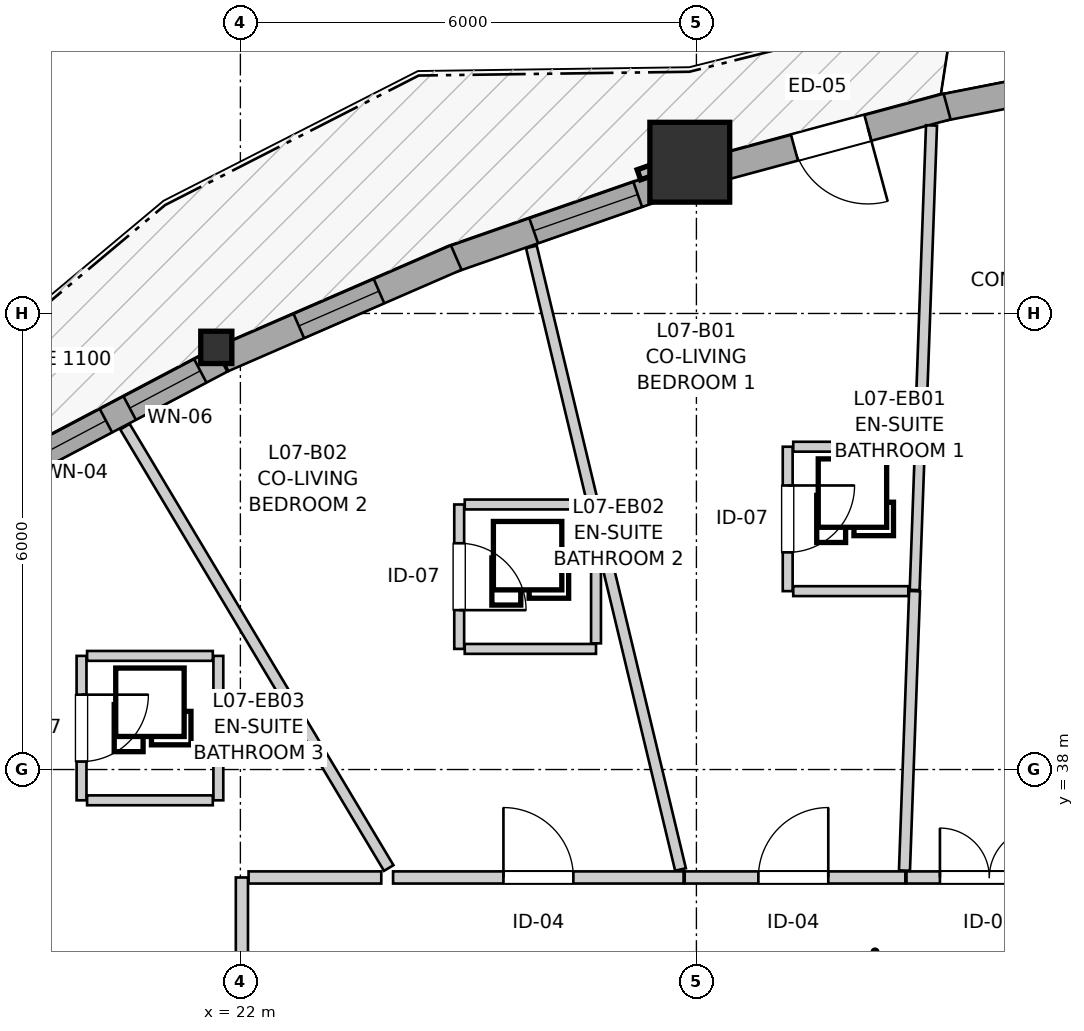
"""IFC4 building model, lengths in metres.
Left out: names, types, materials, properties, quantities, classifications, styles, units other than length and angle.
Written with IfcOpenShell. Run it as: python <this file> out.ifc"""

import sys

from ifc_helpers import new_model, si_unit, direction, frame, frame_2d, origin, origin_2d, place, context, subcontext, project, spatial, rectangle, i_section, extrude, source, transform, mapped, element, fill, save


model = new_model("IFC4")
c1 = context("Model", 3, precision=1e-05, world=origin(), true_north=direction((0.0, 1.0)))
c2 = subcontext(c1, "Body", "Model", "MODEL_VIEW")
j1 = project(units=[si_unit("LENGTHUNIT", "METRE"), si_unit("PLANEANGLEUNIT", "RADIAN")], contexts=[c1])
p1 = place(None, origin())
s1 = spatial("IfcSite", under=j1, at=p1, CompositionType="ELEMENT")
p2 = place(p1, origin())
s2 = spatial("IfcBuilding", under=s1, at=p2, CompositionType="ELEMENT")
p3 = place(p2, frame((0.0, 0.0, 27.0)))
s3 = spatial("IfcBuildingStorey", under=s2, at=p3, CompositionType="ELEMENT", Elevation=27.0)
m1 = source(origin(), c2, "Body", "SweptSolid", [
    extrude(rectangle(XDim=1.05, YDim=1.05, at=origin_2d()), origin(), (0.0, 0.0, 1.0), 2.935),
])
p4 = place(p3, frame((27.913, 45.99, 0.0), z_axis=(0.0, 0.0, 1.0), x_axis=(1.0, 0.0, 0.0)))
e1 = element("IfcColumn", 1, at=p4, inside=s3, PredefinedType="COLUMN", context=c2, shape_type="MappedRepresentation", body=[
    mapped(m1, transform((0.0, 0.0, 0.0), x_axis=(1.0, 0.0, 0.0), y_axis=(0.0, 1.0, 0.0), z_axis=(0.0, 0.0, 1.0), scale=1.0)),
])
m2 = source(origin(), c2, "Body", "SweptSolid", [
    extrude(i_section(OverallWidth=0.409, OverallDepth=0.425, WebThickness=0.03, FlangeThickness=0.048, FilletRadius=0.015, at=origin_2d()), origin(), (0.0, 0.0, 1.0), 2.935),
])
p5 = place(p3, frame((21.683, 43.554, 0.0), z_axis=(0.0, 0.0, 1.0), x_axis=(1.0, 0.0, 0.0)))
e2 = element("IfcColumn", 2, at=p5, inside=s3, PredefinedType="PILASTER", context=c2, shape_type="MappedRepresentation", body=[
    mapped(m2, transform((0.0, 0.0, 0.0), x_axis=(1.0, 0.0, 0.0), y_axis=(0.0, 1.0, 0.0), z_axis=(0.0, 0.0, 1.0), scale=1.0)),
])
p6 = place(p3, frame((34.659, 47.38, 0.0), z_axis=(0.0, 0.0, 1.0), x_axis=(-0.981222284826, -0.19288034571, 0.0)))
e3 = element("IfcWall", 3, at=p6, inside=s3, PredefinedType="SOLIDWALL", context=c2, shape_type="SweptSolid", body=[
    extrude(rectangle(XDim=3.512, YDim=0.35, at=frame_2d((1.756, 0.0))), origin(), (0.0, 0.0, 1.0), 2.415),
])
p7 = place(p6, frame((1.021, 0.0, 0.82)))
e4 = element("IfcOpeningElement", 4, at=p7, cuts=e3, PredefinedType="OPENING", context=c2, shape_type="SweptSolid", body=[
    extrude(rectangle(XDim=1.45, YDim=1.25, at=frame_2d((0.725, 0.625))), frame((0.0, 0.185, 0.0), z_axis=(0.0, -1.0, 0.0), x_axis=(1.0, 0.0, 0.0)), (0.0, 0.0, 1.0), 0.37),
])
p8 = place(p3, frame((31.298, 46.722, 0.0), z_axis=(0.0, 0.0, 1.0), x_axis=(-0.965455913242, -0.260566459057, 0.0)))
e5 = element("IfcWall", 5, at=p8, inside=s3, PredefinedType="SOLIDWALL", context=c2, shape_type="SweptSolid", body=[
    extrude(rectangle(XDim=3.159, YDim=0.35, at=frame_2d((1.58, 0.0))), origin(), (0.0, 0.0, 1.0), 2.415),
])
p9 = place(p8, frame((1.08, 0.0, 0.0)))
e6 = element("IfcOpeningElement", 6, at=p9, cuts=e5, PredefinedType="OPENING", context=c2, shape_type="SweptSolid", body=[
    extrude(rectangle(XDim=1.0, YDim=2.1, at=frame_2d((0.5, 1.05))), frame((0.0, 0.185, 0.0), z_axis=(0.0, -1.0, 0.0), x_axis=(1.0, 0.0, 0.0)), (0.0, 0.0, 1.0), 0.37),
])
p10 = place(p3, frame((27.687, 45.726, 0.0), z_axis=(0.0, 0.0, 1.0), x_axis=(-0.9441205041, -0.329600475936, 0.0)))
e7 = element("IfcWall", 7, at=p10, inside=s3, PredefinedType="SOLIDWALL", context=c2, shape_type="SweptSolid", body=[
    extrude(rectangle(XDim=3.104, YDim=0.35, at=frame_2d((1.552, 0.0))), origin(), (0.0, 0.0, 1.0), 2.415),
])
p11 = place(p10, frame((0.486, 0.0, 0.82)))
e8 = element("IfcOpeningElement", 8, at=p11, cuts=e7, PredefinedType="OPENING", context=c2, shape_type="SweptSolid", body=[
    extrude(rectangle(XDim=1.45, YDim=1.25, at=frame_2d((0.725, 0.625))), frame((0.0, 0.185, 0.0), z_axis=(0.0, -1.0, 0.0), x_axis=(1.0, 0.0, 0.0)), (0.0, 0.0, 1.0), 0.37),
])
p12 = place(p3, frame((24.84, 44.735, 0.0), z_axis=(0.0, 0.0, 1.0), x_axis=(-0.917090935142, -0.398678086532, 0.0)))
e9 = element("IfcWall", 9, at=p12, inside=s3, PredefinedType="SOLIDWALL", context=c2, shape_type="SweptSolid", body=[
    extrude(rectangle(XDim=3.346, YDim=0.35, at=frame_2d((1.673, 0.0))), origin(), (0.0, 0.0, 1.0), 2.415),
])
p13 = place(p12, frame((1.108, 0.0, 0.82)))
e10 = element("IfcOpeningElement", 10, at=p13, cuts=e9, PredefinedType="OPENING", context=c2, shape_type="SweptSolid", body=[
    extrude(rectangle(XDim=1.15, YDim=1.2, at=frame_2d((0.575, 0.6))), frame((0.0, 0.185, 0.0), z_axis=(0.0, -1.0, 0.0), x_axis=(1.0, 0.0, 0.0)), (0.0, 0.0, 1.0), 0.37),
])
p14 = place(p3, frame((21.747, 43.39, 0.0), z_axis=(0.0, 0.0, 1.0), x_axis=(-0.88437802144, -0.46677137358, 0.0)))
e11 = element("IfcWall", 11, at=p14, inside=s3, PredefinedType="SOLIDWALL", context=c2, shape_type="SweptSolid", body=[
    extrude(rectangle(XDim=3.327, YDim=0.35, at=frame_2d((1.664, 0.0))), origin(), (0.0, 0.0, 1.0), 2.415),
])
p15 = place(p14, frame((0.311, 0.0, 0.82)))
e12 = element("IfcOpeningElement", 12, at=p15, cuts=e11, PredefinedType="OPENING", context=c2, shape_type="SweptSolid", body=[
    extrude(rectangle(XDim=1.05, YDim=1.45, at=frame_2d((0.525, 0.725))), frame((0.0, 0.185, 0.0), z_axis=(0.0, -1.0, 0.0), x_axis=(1.0, 0.0, 0.0)), (0.0, 0.0, 1.0), 0.37),
])
p16 = place(p14, frame((1.714, 0.0, 0.82)))
e13 = element("IfcOpeningElement", 13, at=p16, cuts=e11, PredefinedType="OPENING", context=c2, shape_type="SweptSolid", body=[
    extrude(rectangle(XDim=1.35, YDim=1.45, at=frame_2d((0.675, 0.725))), frame((0.0, 0.185, 0.0), z_axis=(0.0, -1.0, 0.0), x_axis=(1.0, 0.0, 0.0)), (0.0, 0.0, 1.0), 0.37),
])
p17 = place(p3, frame((22.02, 32.71, 0.0), z_axis=(0.0, 0.0, 1.0), x_axis=(0.0, 1.0, 0.0)))
e14 = element("IfcWall", 14, at=p17, inside=s3, PredefinedType="PARTITIONING", context=c2, shape_type="SweptSolid", body=[
    extrude(rectangle(XDim=3.87, YDim=0.16, at=frame_2d((1.935, 0.0))), origin(), (0.0, 0.0, 1.0), 2.935),
])
p18 = place(p17, frame((1.485, 0.0, 0.0)))
e15 = element("IfcOpeningElement", 15, at=p18, cuts=e14, PredefinedType="OPENING", context=c2, shape_type="SweptSolid", body=[
    extrude(rectangle(XDim=0.92, YDim=2.1, at=frame_2d((0.46, 1.05))), frame((0.0, 0.09, 0.0), z_axis=(0.0, -1.0, 0.0), x_axis=(1.0, 0.0, 0.0)), (0.0, 0.0, 1.0), 0.18),
])
p19 = place(p3, frame((24.009, 36.58, 0.0), z_axis=(0.0, 0.0, 1.0), x_axis=(1.0, 0.0, 0.0)))
e16 = element("IfcWall", 16, at=p19, inside=s3, PredefinedType="PARTITIONING", context=c2, shape_type="SweptSolid", body=[
    extrude(rectangle(XDim=3.822, YDim=0.16, at=frame_2d((1.911, 0.0))), origin(), (0.0, 0.0, 1.0), 2.543),
])
p20 = place(p19, frame((1.452, 0.0, 0.0)))
e17 = element("IfcOpeningElement", 17, at=p20, cuts=e16, PredefinedType="OPENING", context=c2, shape_type="SweptSolid", body=[
    extrude(rectangle(XDim=0.92, YDim=2.1, at=frame_2d((0.46, 1.05))), frame((0.0, 0.09, 0.0), z_axis=(0.0, -1.0, 0.0), x_axis=(1.0, 0.0, 0.0)), (0.0, 0.0, 1.0), 0.18),
])
p21 = place(p3, frame((27.846, 36.58, 0.0), z_axis=(0.0, 0.0, 1.0), x_axis=(1.0, 0.0, 0.0)))
e18 = element("IfcWall", 18, at=p21, inside=s3, PredefinedType="PARTITIONING", context=c2, shape_type="SweptSolid", body=[
    extrude(rectangle(XDim=2.903, YDim=0.16, at=frame_2d((1.452, 0.0))), origin(), (0.0, 0.0, 1.0), 2.935),
])
p22 = place(p21, frame((0.969, 0.0, 0.0)))
e19 = element("IfcOpeningElement", 19, at=p22, cuts=e18, PredefinedType="OPENING", context=c2, shape_type="SweptSolid", body=[
    extrude(rectangle(XDim=0.92, YDim=2.1, at=frame_2d((0.46, 1.05))), frame((0.0, 0.09, 0.0), z_axis=(0.0, -1.0, 0.0), x_axis=(1.0, 0.0, 0.0)), (0.0, 0.0, 1.0), 0.18),
])
p23 = place(p3, frame((30.764, 36.58, 0.0), z_axis=(0.0, 0.0, 1.0), x_axis=(1.0, 0.0, 0.0)))
e20 = element("IfcWall", 20, at=p23, inside=s3, PredefinedType="PARTITIONING", context=c2, shape_type="SweptSolid", body=[
    extrude(rectangle(XDim=2.225, YDim=0.16, at=frame_2d((1.113, 0.0))), origin(), (0.0, 0.0, 1.0), 2.935),
])
p24 = place(p23, frame((0.44, 0.0, 0.0)))
e21 = element("IfcOpeningElement", 21, at=p24, cuts=e20, PredefinedType="OPENING", context=c2, shape_type="SweptSolid", body=[
    extrude(rectangle(XDim=1.3, YDim=2.1, at=frame_2d((0.65, 1.05))), frame((0.0, 0.09, 0.0), z_axis=(0.0, -1.0, 0.0), x_axis=(1.0, 0.0, 0.0)), (0.0, 0.0, 1.0), 0.18),
])
p25 = place(p3, frame((29.201, 42.247, 0.0), z_axis=(0.0, 0.0, 1.0), x_axis=(0.0, -1.0, 0.0)))
e22 = element("IfcWall", 22, at=p25, inside=s3, PredefinedType="PARTITIONING", context=c2, shape_type="SweptSolid", body=[
    extrude(rectangle(XDim=1.9, YDim=0.13, at=frame_2d((0.95, 0.0))), origin(), (0.0, 0.0, 1.0), 2.935),
])
p26 = place(p25, frame((0.51, 0.0, 0.0)))
e23 = element("IfcOpeningElement", 23, at=p26, cuts=e22, PredefinedType="OPENING", context=c2, shape_type="SweptSolid", body=[
    extrude(rectangle(XDim=0.88, YDim=2.05, at=frame_2d((0.44, 1.025))), frame((0.0, 0.075, 0.0), z_axis=(0.0, -1.0, 0.0), x_axis=(1.0, 0.0, 0.0)), (0.0, 0.0, 1.0), 0.15),
])
p27 = place(p3, frame((24.879, 41.487, 0.0), z_axis=(0.0, 0.0, 1.0), x_axis=(0.0, -1.0, 0.0)))
e24 = element("IfcWall", 24, at=p27, inside=s3, PredefinedType="PARTITIONING", context=c2, shape_type="SweptSolid", body=[
    extrude(rectangle(XDim=1.9, YDim=0.13, at=frame_2d((0.95, 0.0))), origin(), (0.0, 0.0, 1.0), 2.935),
])
p28 = place(p27, frame((0.51, 0.0, 0.0)))
e25 = element("IfcOpeningElement", 25, at=p28, cuts=e24, PredefinedType="OPENING", context=c2, shape_type="SweptSolid", body=[
    extrude(rectangle(XDim=0.88, YDim=2.05, at=frame_2d((0.44, 1.025))), frame((0.0, 0.075, 0.0), z_axis=(0.0, -1.0, 0.0), x_axis=(1.0, 0.0, 0.0)), (0.0, 0.0, 1.0), 0.15),
])
p29 = place(p3, frame((19.91, 39.495, 0.0), z_axis=(0.0, 0.0, 1.0), x_axis=(0.0, -1.0, 0.0)))
e26 = element("IfcWall", 26, at=p29, inside=s3, PredefinedType="PARTITIONING", context=c2, shape_type="SweptSolid", body=[
    extrude(rectangle(XDim=1.9, YDim=0.13, at=frame_2d((0.95, 0.0))), origin(), (0.0, 0.0, 1.0), 2.935),
])
p30 = place(p29, frame((0.51, 0.0, 0.0)))
e27 = element("IfcOpeningElement", 27, at=p30, cuts=e26, PredefinedType="OPENING", context=c2, shape_type="SweptSolid", body=[
    extrude(rectangle(XDim=0.88, YDim=2.05, at=frame_2d((0.44, 1.025))), frame((0.0, 0.075, 0.0), z_axis=(0.0, -1.0, 0.0), x_axis=(1.0, 0.0, 0.0)), (0.0, 0.0, 1.0), 0.15),
])
p31 = place(p3, frame((11.92, 36.618, 0.0), z_axis=(0.0, 0.0, 1.0), x_axis=(0.866473494239, -0.499223080177, 0.0)))
e28 = element("IfcWall", 28, at=p31, inside=s3, PredefinedType="PARTITIONING", context=c2, shape_type="SweptSolid", body=[
    extrude(rectangle(XDim=11.514, YDim=0.145, at=frame_2d((5.757, 0.0))), origin(), (0.0, 0.0, 1.0), 2.935),
])
p32 = place(p3, frame((14.566, 38.751, 0.0), z_axis=(0.0, 0.0, 1.0), x_axis=(0.777881688073, -0.628410756879, 0.0)))
e29 = element("IfcWall", 29, at=p32, inside=s3, PredefinedType="PARTITIONING", context=c2, shape_type="SweptSolid", body=[
    extrude(rectangle(XDim=9.413, YDim=0.145, at=frame_2d((4.707, 0.0))), origin(), (0.0, 0.0, 1.0), 2.935),
])
p33 = place(p3, frame((20.481, 42.51, 0.0), z_axis=(0.0, 0.0, 1.0), x_axis=(0.513067331262, -0.858348363773, 0.0)))
e30 = element("IfcWall", 30, at=p33, inside=s3, PredefinedType="PARTITIONING", context=c2, shape_type="SweptSolid", body=[
    extrude(rectangle(XDim=6.765, YDim=0.145, at=frame_2d((3.382, 0.0))), origin(), (0.0, 0.0, 1.0), 2.935),
])
p34 = place(p3, frame((26.664, 41.388, 0.0), z_axis=(0.0, 0.0, 1.0), x_axis=(0.233021630241, -0.972471552201, 0.0)))
e31 = element("IfcWall", 31, at=p34, inside=s3, PredefinedType="PARTITIONING", context=c2, shape_type="SweptSolid", body=[
    extrude(rectangle(XDim=4.836, YDim=0.145, at=frame_2d((2.418, 0.0))), origin(), (0.0, 0.0, 1.0), 2.935),
])
p35 = place(p3, frame((30.94, 42.247, 0.0), z_axis=(0.0, 0.0, 1.0), x_axis=(0.03624948077, 0.999342771597, 0.0)))
e32 = element("IfcWall", 32, at=p35, inside=s3, PredefinedType="PARTITIONING", context=c2, shape_type="SweptSolid", body=[
    extrude(rectangle(XDim=4.229, YDim=0.145, at=frame_2d((2.115, 0.0))), origin(), (0.0, 0.0, 1.0), 2.935),
])
p36 = place(p3, frame((30.737, 36.671, 0.0), z_axis=(0.0, 0.0, 1.0), x_axis=(0.036368539535, 0.999338445839, 0.0)))
e33 = element("IfcWall", 33, at=p36, inside=s3, PredefinedType="PARTITIONING", context=c2, shape_type="SweptSolid", body=[
    extrude(rectangle(XDim=3.679, YDim=0.145, at=frame_2d((1.839, 0.0))), origin(), (0.0, 0.0, 1.0), 2.935),
])
p37 = place(p3, frame((25.829, 44.875, 0.0), z_axis=(0.0, 0.0, 1.0), x_axis=(0.232921769711, -0.972495475154, 0.0)))
e34 = element("IfcWall", 34, at=p37, inside=s3, PredefinedType="PARTITIONING", context=c2, shape_type="SweptSolid", body=[
    extrude(rectangle(XDim=3.5, YDim=0.145, at=frame_2d((1.75, 0.0))), origin(), (0.0, 0.0, 1.0), 2.935),
])
p38 = place(p3, frame((22.108, 36.58, 0.0), z_axis=(0.0, 0.0, 1.0), x_axis=(1.0, 0.0, 0.0)))
e35 = element("IfcWall", 35, at=p38, inside=s3, PredefinedType="PARTITIONING", context=c2, shape_type="SweptSolid", body=[
    extrude(rectangle(XDim=1.746, YDim=0.16, at=frame_2d((0.873, 0.0))), origin(), (0.0, 0.0, 1.0), 2.543),
])
p39 = place(p3, frame((21.71, 37.595, 0.0), z_axis=(0.0, 0.0, 1.0), x_axis=(0.0, 1.0, 0.0)))
e36 = element("IfcWall", 36, at=p39, inside=s3, PredefinedType="PARTITIONING", context=c2, shape_type="SweptSolid", body=[
    extrude(rectangle(XDim=1.9, YDim=0.13, at=frame_2d((0.95, 0.0))), origin(), (0.0, 0.0, 1.0), 2.935),
])
p40 = place(p3, frame((30.872, 40.362, 0.0), z_axis=(0.0, 0.0, 1.0), x_axis=(0.036273279858, 0.999341908042, 0.0)))
e37 = element("IfcWall", 37, at=p40, inside=s3, PredefinedType="PARTITIONING", context=c2, shape_type="SweptSolid", body=[
    extrude(rectangle(XDim=1.871, YDim=0.13, at=frame_2d((0.936, 0.0))), origin(), (0.0, 0.0, 1.0), 2.935),
])
for number, where, z_axis, x_axis in (
    (38, (19.983, 39.495, 0.0), (0.0, 0.0, 1.0), (1.0, 0.0, 0.0)),
    (39, (19.983, 37.595, 0.0), (0.0, 0.0, 1.0), (1.0, 0.0, 0.0)),
):
    element("IfcWall", number, at=place(p3, frame(where, z_axis=z_axis, x_axis=x_axis)), inside=s3, PredefinedType="PARTITIONING", context=c2, shape_type="SweptSolid", body=[
        extrude(rectangle(XDim=1.654, YDim=0.13, at=frame_2d((0.827, 0.0))), origin(), (0.0, 0.0, 1.0), 2.935),
    ])
p41 = place(p3, frame((24.952, 39.587, 0.0), z_axis=(0.0, 0.0, 1.0), x_axis=(1.0, 0.0, 0.0)))
e40 = element("IfcWall", 40, at=p41, inside=s3, PredefinedType="PARTITIONING", context=c2, shape_type="SweptSolid", body=[
    extrude(rectangle(XDim=1.727, YDim=0.13, at=frame_2d((0.864, 0.0))), origin(), (0.0, 0.0, 1.0), 2.935),
])
p42 = place(p3, frame((24.952, 41.487, 0.0), z_axis=(0.0, 0.0, 1.0), x_axis=(1.0, 0.0, 0.0)))
e41 = element("IfcWall", 41, at=p42, inside=s3, PredefinedType="PARTITIONING", context=c2, shape_type="SweptSolid", body=[
    extrude(rectangle(XDim=1.59, YDim=0.13, at=frame_2d((0.795, 0.0))), origin(), (0.0, 0.0, 1.0), 2.503),
])
p43 = place(p3, frame((29.274, 42.247, 0.0), z_axis=(0.0, 0.0, 1.0), x_axis=(1.0, 0.0, 0.0)))
e42 = element("IfcWall", 42, at=p43, inside=s3, PredefinedType="PARTITIONING", context=c2, shape_type="SweptSolid", body=[
    extrude(rectangle(XDim=1.583, YDim=0.13, at=frame_2d((0.792, 0.0))), origin(), (0.0, 0.0, 1.0), 2.503),
])
p44 = place(p3, frame((26.679, 39.66, 0.0), z_axis=(0.0, 0.0, 1.0), x_axis=(0.0, 1.0, 0.0)))
e43 = element("IfcWall", 43, at=p44, inside=s3, PredefinedType="PARTITIONING", context=c2, shape_type="SweptSolid", body=[
    extrude(rectangle(XDim=1.38, YDim=0.13, at=frame_2d((0.69, 0.0))), origin(), (0.0, 0.0, 1.0), 2.935),
])
p45 = place(p3, frame((29.274, 40.347, 0.0), z_axis=(0.0, 0.0, 1.0), x_axis=(1.0, 0.0, 0.0)))
e44 = element("IfcWall", 44, at=p45, inside=s3, PredefinedType="PARTITIONING", context=c2, shape_type="SweptSolid", body=[
    extrude(rectangle(XDim=1.514, YDim=0.13, at=frame_2d((0.757, 0.0))), origin(), (0.0, 0.0, 1.0), 2.935),
])
m3 = source(origin(), c2, "Body", "SweptSolid", [
    extrude(rectangle(XDim=1.45, YDim=1.25, at=frame_2d((0.725, 0.625))), frame((0.0, 0.03, 0.0), z_axis=(0.0, -1.0, 0.0), x_axis=(1.0, 0.0, 0.0)), (0.0, 0.0, 1.0), 0.06),
])
p46 = place(p11, origin())
e45 = element("IfcWindow", 45, at=p46, inside=s3, PartitioningType="SINGLE_PANEL", PredefinedType="WINDOW", context=c2, shape_type="MappedRepresentation", body=[
    mapped(m3, transform((0.0, 0.0, 0.0), x_axis=(1.0, 0.0, 0.0), y_axis=(0.0, 1.0, 0.0), z_axis=(0.0, 0.0, 1.0), scale=1.0)),
])
fill(e8, e45)
m4 = source(origin(), c2, "Body", "SweptSolid", [
    extrude(rectangle(XDim=1.15, YDim=1.2, at=frame_2d((0.575, 0.6))), frame((0.0, 0.03, 0.0), z_axis=(0.0, -1.0, 0.0), x_axis=(1.0, 0.0, 0.0)), (0.0, 0.0, 1.0), 0.06),
])
p47 = place(p13, origin())
e46 = element("IfcWindow", 46, at=p47, inside=s3, PartitioningType="SINGLE_PANEL", PredefinedType="WINDOW", context=c2, shape_type="MappedRepresentation", body=[
    mapped(m4, transform((0.0, 0.0, 0.0), x_axis=(1.0, 0.0, 0.0), y_axis=(0.0, 1.0, 0.0), z_axis=(0.0, 0.0, 1.0), scale=1.0)),
])
fill(e10, e46)
m5 = source(origin(), c2, "Body", "SweptSolid", [
    extrude(rectangle(XDim=1.05, YDim=1.45, at=frame_2d((0.525, 0.725))), frame((0.0, 0.03, 0.0), z_axis=(0.0, -1.0, 0.0), x_axis=(1.0, 0.0, 0.0)), (0.0, 0.0, 1.0), 0.06),
])
p48 = place(p15, origin())
e47 = element("IfcWindow", 47, at=p48, inside=s3, PartitioningType="SINGLE_PANEL", PredefinedType="WINDOW", context=c2, shape_type="MappedRepresentation", body=[
    mapped(m5, transform((0.0, 0.0, 0.0), x_axis=(1.0, 0.0, 0.0), y_axis=(0.0, 1.0, 0.0), z_axis=(0.0, 0.0, 1.0), scale=1.0)),
])
fill(e12, e47)
m6 = source(origin(), c2, "Body", "SweptSolid", [
    extrude(rectangle(XDim=1.35, YDim=1.45, at=frame_2d((0.675, 0.725))), frame((0.0, 0.03, 0.0), z_axis=(0.0, -1.0, 0.0), x_axis=(1.0, 0.0, 0.0)), (0.0, 0.0, 1.0), 0.06),
])
p49 = place(p16, origin())
e48 = element("IfcWindow", 48, at=p49, inside=s3, PartitioningType="SINGLE_PANEL", PredefinedType="WINDOW", context=c2, shape_type="MappedRepresentation", body=[
    mapped(m6, transform((0.0, 0.0, 0.0), x_axis=(1.0, 0.0, 0.0), y_axis=(0.0, 1.0, 0.0), z_axis=(0.0, 0.0, 1.0), scale=1.0)),
])
fill(e13, e48)
m7 = source(origin(), c2, "Body", "SweptSolid", [
    extrude(rectangle(XDim=1.0, YDim=2.1, at=frame_2d((0.5, 1.05))), frame((0.0, 0.025, 0.0), z_axis=(0.0, -1.0, 0.0), x_axis=(1.0, 0.0, 0.0)), (0.0, 0.0, 1.0), 0.05),
])
p50 = place(p9, origin())
e49 = element("IfcDoor", 49, at=p50, inside=s3, OperationType="SINGLE_SWING_LEFT", PredefinedType="DOOR", context=c2, shape_type="MappedRepresentation", body=[
    mapped(m7, transform((0.0, 0.0, 0.0), x_axis=(1.0, 0.0, 0.0), y_axis=(0.0, 1.0, 0.0), z_axis=(0.0, 0.0, 1.0), scale=1.0)),
])
fill(e6, e49)
m8 = source(origin(), c2, "Body", "SweptSolid", [
    extrude(rectangle(XDim=0.92, YDim=2.1, at=frame_2d((0.46, 1.05))), frame((0.0, 0.025, 0.0), z_axis=(0.0, -1.0, 0.0), x_axis=(1.0, 0.0, 0.0)), (0.0, 0.0, 1.0), 0.05),
])
p51 = place(p20, origin())
e50 = element("IfcDoor", 50, at=p51, inside=s3, OperationType="SINGLE_SWING_LEFT", PredefinedType="DOOR", context=c2, shape_type="MappedRepresentation", body=[
    mapped(m8, transform((0.0, 0.0, 0.0), x_axis=(1.0, 0.0, 0.0), y_axis=(0.0, 1.0, 0.0), z_axis=(0.0, 0.0, 1.0), scale=1.0)),
])
fill(e17, e50)
p52 = place(p22, origin())
e51 = element("IfcDoor", 51, at=p52, inside=s3, OperationType="SINGLE_SWING_RIGHT", PredefinedType="DOOR", context=c2, shape_type="MappedRepresentation", body=[
    mapped(m8, transform((0.0, 0.0, 0.0), x_axis=(1.0, 0.0, 0.0), y_axis=(0.0, 1.0, 0.0), z_axis=(0.0, 0.0, 1.0), scale=1.0)),
])
fill(e19, e51)
m9 = source(origin(), c2, "Body", "SweptSolid", [
    extrude(rectangle(XDim=1.3, YDim=2.1, at=frame_2d((0.65, 1.05))), frame((0.0, 0.025, 0.0), z_axis=(0.0, -1.0, 0.0), x_axis=(1.0, 0.0, 0.0)), (0.0, 0.0, 1.0), 0.05),
])
p53 = place(p24, origin())
e52 = element("IfcDoor", 52, at=p53, inside=s3, OperationType="DOUBLE_DOOR_SINGLE_SWING", PredefinedType="DOOR", context=c2, shape_type="MappedRepresentation", body=[
    mapped(m9, transform((0.0, 0.0, 0.0), x_axis=(1.0, 0.0, 0.0), y_axis=(0.0, 1.0, 0.0), z_axis=(0.0, 0.0, 1.0), scale=1.0)),
])
fill(e21, e52)
m10 = source(origin(), c2, "Body", "SweptSolid", [
    extrude(rectangle(XDim=0.88, YDim=2.05, at=frame_2d((0.44, 1.025))), frame((0.0, 0.025, 0.0), z_axis=(0.0, -1.0, 0.0), x_axis=(1.0, 0.0, 0.0)), (0.0, 0.0, 1.0), 0.05),
])
p54 = place(p26, origin())
e53 = element("IfcDoor", 53, at=p54, inside=s3, OperationType="SINGLE_SWING_LEFT", PredefinedType="DOOR", context=c2, shape_type="MappedRepresentation", body=[
    mapped(m10, transform((0.0, 0.0, 0.0), x_axis=(1.0, 0.0, 0.0), y_axis=(0.0, 1.0, 0.0), z_axis=(0.0, 0.0, 1.0), scale=1.0)),
])
fill(e23, e53)
p55 = place(p28, origin())
e54 = element("IfcDoor", 54, at=p55, inside=s3, OperationType="SINGLE_SWING_RIGHT", PredefinedType="DOOR", context=c2, shape_type="MappedRepresentation", body=[
    mapped(m10, transform((0.0, 0.0, 0.0), x_axis=(1.0, 0.0, 0.0), y_axis=(0.0, 1.0, 0.0), z_axis=(0.0, 0.0, 1.0), scale=1.0)),
])
fill(e25, e54)
p56 = place(p30, origin())
e55 = element("IfcDoor", 55, at=p56, inside=s3, OperationType="SINGLE_SWING_LEFT", PredefinedType="DOOR", context=c2, shape_type="MappedRepresentation", body=[
    mapped(m10, transform((0.0, 0.0, 0.0), x_axis=(1.0, 0.0, 0.0), y_axis=(0.0, 1.0, 0.0), z_axis=(0.0, 0.0, 1.0), scale=1.0)),
])
fill(e27, e55)
save(model, sys.argv[1])
